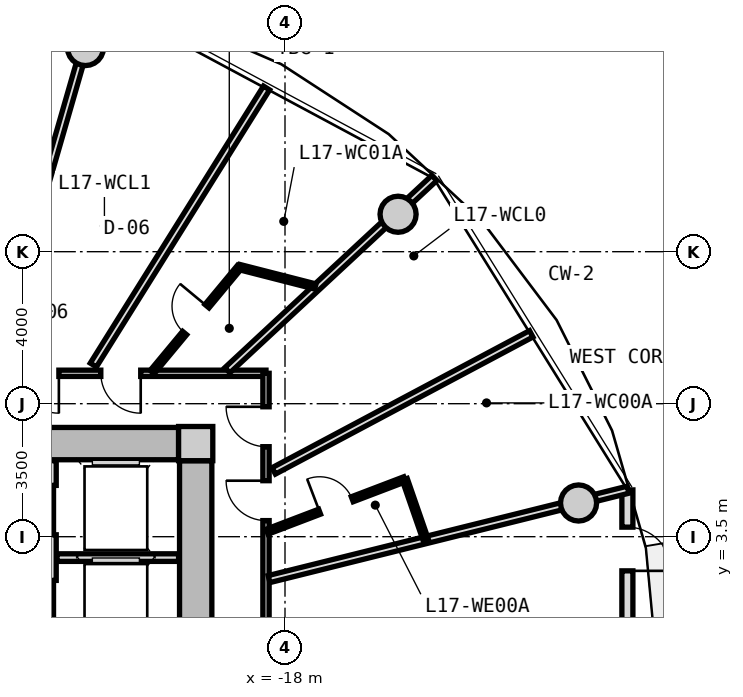
"""IFC4 building model, lengths in metres.
Left out: names, types, materials, properties, quantities, classifications, styles, units other than length and angle.
Written with IfcOpenShell. Run it as: python <this file> out.ifc"""

import sys

from ifc_helpers import new_model, si_unit, direction, frame, frame_2d, origin, origin_2d, place, context, subcontext, project, spatial, rectangle, circle, extrude, source, transform, mapped, element, fill, save


model = new_model("IFC4")
c1 = context("Model", 3, precision=1e-05, world=origin(), true_north=direction((0.0, 1.0)))
c2 = subcontext(c1, "Body", "Model", "MODEL_VIEW")
j1 = project(units=[si_unit("LENGTHUNIT", "METRE"), si_unit("PLANEANGLEUNIT", "RADIAN")], contexts=[c1])
p1 = place(None, origin())
s1 = spatial("IfcSite", under=j1, at=p1, CompositionType="ELEMENT")
p2 = place(p1, origin())
s2 = spatial("IfcBuilding", under=s1, at=p2, CompositionType="ELEMENT")
p3 = place(p2, frame((0.0, 0.0, 58.2)))
s3 = spatial("IfcBuildingStorey", under=s2, at=p3, CompositionType="ELEMENT", Elevation=58.2)
m1 = source(origin(), c2, "Body", "SweptSolid", [
    extrude(rectangle(XDim=0.9, YDim=0.9, at=origin_2d()), origin(), (0.0, 0.0, 1.0), 3.05),
])
p4 = place(p3, frame((-20.35, 5.95, 0.0), z_axis=(0.0, 0.0, 1.0), x_axis=(1.0, 0.0, 0.0)))
e1 = element("IfcColumn", 1, at=p4, inside=s3, PredefinedType="COLUMN", context=c2, shape_type="MappedRepresentation", body=[
    mapped(m1, transform((0.0, 0.0, 0.0), x_axis=(1.0, 0.0, 0.0), y_axis=(0.0, 1.0, 0.0), z_axis=(0.0, 0.0, 1.0), scale=1.0)),
])
m2 = source(origin(), c2, "Body", "SweptSolid", [
    extrude(rectangle(XDim=14.4, YDim=0.85, at=frame_2d((7.2, 0.0))), origin(), (0.0, 0.0, 1.0), 2.79),
])
p5 = place(p3, frame((-35.2, 5.95, 0.0), z_axis=(0.0, 0.0, 1.0), x_axis=(1.0, 0.0, 0.0)))
e2 = element("IfcWall", 2, at=p5, inside=s3, PredefinedType="SHEAR", context=c2, shape_type="MappedRepresentation", body=[
    mapped(m2, transform((0.0, 0.0, 0.0), x_axis=(1.0, 0.0, 0.0), y_axis=(0.0, 1.0, 0.0), z_axis=(0.0, 0.0, 1.0), scale=1.0)),
])
m3 = source(origin(), c2, "Body", "SweptSolid", [
    extrude(rectangle(XDim=11.0, YDim=0.85, at=frame_2d((5.5, 0.0))), origin(), (0.0, 0.0, 1.0), 2.79),
])
p6 = place(p3, frame((-20.35, 5.5, 0.0), z_axis=(0.0, 0.0, 1.0), x_axis=(0.0, -1.0, 0.0)))
e3 = element("IfcWall", 3, at=p6, inside=s3, PredefinedType="SHEAR", context=c2, shape_type="MappedRepresentation", body=[
    mapped(m3, transform((0.0, 0.0, 0.0), x_axis=(1.0, 0.0, 0.0), y_axis=(0.0, 1.0, 0.0), z_axis=(0.0, 0.0, 1.0), scale=1.0)),
])
p7 = place(p6, frame((5.65, 0.0, 0.0)))
e4 = element("IfcOpeningElement", 4, at=p7, cuts=e3, PredefinedType="OPENING", context=c2, shape_type="SweptSolid", body=[
    extrude(rectangle(XDim=1.2, YDim=2.15, at=frame_2d((0.6, 1.075))), frame((0.0, 0.435, 0.0), z_axis=(0.0, -1.0, 0.0), x_axis=(1.0, 0.0, 0.0)), (0.0, 0.0, 1.0), 0.87),
])
p8 = place(p6, frame((9.3, 0.0, 0.0)))
e5 = element("IfcOpeningElement", 5, at=p8, cuts=e3, PredefinedType="OPENING", context=c2, shape_type="SweptSolid", body=[
    extrude(rectangle(XDim=1.0, YDim=2.1, at=frame_2d((0.5, 1.05))), frame((0.0, 0.435, 0.0), z_axis=(0.0, -1.0, 0.0), x_axis=(1.0, 0.0, 0.0)), (0.0, 0.0, 1.0), 0.87),
])
m4 = source(origin(), c2, "Body", "SweptSolid", [
    extrude(circle(Radius=0.475, at=origin_2d()), origin(), (0.0, 0.0, 1.0), 3.05),
])
for number, where, z_axis, x_axis in (
    (6, (-10.275, 4.387, 0.0), (0.0, 0.0, 1.0), (1.0, 0.0, 0.0)),
    (7, (-15.025, 11.985, 0.0), (0.0, 0.0, 1.0), (1.0, 0.0, 0.0)),
    (8, (-23.251, 16.373, 0.0), (0.0, 0.0, 1.0), (1.0, 0.0, 0.0)),
):
    element("IfcColumn", number, at=place(p3, frame(where, z_axis=z_axis, x_axis=x_axis)), inside=s3, PredefinedType="COLUMN", context=c2, shape_type="MappedRepresentation", body=[
        mapped(m4, transform((0.0, 0.0, 0.0), x_axis=(1.0, 0.0, 0.0), y_axis=(0.0, 1.0, 0.0), z_axis=(0.0, 0.0, 1.0), scale=1.0)),
    ])
m5 = source(origin(), c2, "Body", "SweptSolid", [
    extrude(rectangle(XDim=9.462, YDim=0.29, at=frame_2d((4.731, 0.0))), origin(), (0.0, 0.0, 1.0), 2.79),
])
p9 = place(p3, frame((-8.99, 4.731, 0.0), z_axis=(0.0, 0.0, 1.0), x_axis=(0.0, -1.0, 0.0)))
e9 = element("IfcWall", 9, at=p9, inside=s3, PredefinedType="SOLIDWALL", context=c2, shape_type="MappedRepresentation", body=[
    mapped(m5, transform((0.0, 0.0, 0.0), x_axis=(1.0, 0.0, 0.0), y_axis=(0.0, 1.0, 0.0), z_axis=(0.0, 0.0, 1.0), scale=1.0)),
])
p10 = place(p9, frame((0.98, 0.0, 0.0)))
e10 = element("IfcOpeningElement", 10, at=p10, cuts=e9, PredefinedType="OPENING", context=c2, shape_type="SweptSolid", body=[
    extrude(rectangle(XDim=1.15, YDim=2.25, at=frame_2d((0.575, 1.125))), frame((0.0, 0.155, 0.0), z_axis=(0.0, -1.0, 0.0), x_axis=(1.0, 0.0, 0.0)), (0.0, 0.0, 1.0), 0.31),
])
p11 = place(p9, frame((5.081, 0.0, 0.85)))
e11 = element("IfcOpeningElement", 11, at=p11, cuts=e9, PredefinedType="OPENING", context=c2, shape_type="SweptSolid", body=[
    extrude(rectangle(XDim=1.2, YDim=1.5, at=frame_2d((0.6, 0.75))), frame((0.0, 0.155, 0.0), z_axis=(0.0, -1.0, 0.0), x_axis=(1.0, 0.0, 0.0)), (0.0, 0.0, 1.0), 0.31),
])
m6 = source(origin(), c2, "Body", "SweptSolid", [
    extrude(rectangle(XDim=5.0, YDim=0.24, at=frame_2d((2.5, 0.0))), origin(), (0.0, 0.0, 1.0), 2.775),
])
p12 = place(p3, frame((-24.14, 0.5, 0.0), z_axis=(0.0, 0.0, 1.0), x_axis=(0.0, 1.0, 0.0)))
e12 = element("IfcWall", 12, at=p12, inside=s3, PredefinedType="PARTITIONING", context=c2, shape_type="MappedRepresentation", body=[
    mapped(m6, transform((0.0, 0.0, 0.0), x_axis=(1.0, 0.0, 0.0), y_axis=(0.0, 1.0, 0.0), z_axis=(0.0, 0.0, 1.0), scale=1.0)),
])
p13 = place(p12, frame((3.05, 0.0, 0.0)))
e13 = element("IfcOpeningElement", 13, at=p13, cuts=e12, PredefinedType="OPENING", context=c2, shape_type="SweptSolid", body=[
    extrude(rectangle(XDim=1.3, YDim=2.2, at=frame_2d((0.65, 1.1))), frame((0.0, 0.13, 0.0), z_axis=(0.0, -1.0, 0.0), x_axis=(1.0, 0.0, 0.0)), (0.0, 0.0, 1.0), 0.26),
])
p14 = place(p12, frame((0.55, 0.0, 0.0)))
e14 = element("IfcOpeningElement", 14, at=p14, cuts=e12, PredefinedType="OPENING", context=c2, shape_type="SweptSolid", body=[
    extrude(rectangle(XDim=1.3, YDim=2.2, at=frame_2d((0.65, 1.1))), frame((0.0, 0.13, 0.0), z_axis=(0.0, -1.0, 0.0), x_axis=(1.0, 0.0, 0.0)), (0.0, 0.0, 1.0), 0.26),
])
m7 = source(origin(), c2, "Body", "SweptSolid", [
    extrude(rectangle(XDim=3.2, YDim=0.2, at=frame_2d((1.6, 0.0))), origin(), (0.0, 0.0, 1.0), 2.775),
])
p15 = place(p3, frame((-24.0, 2.95, 0.0), z_axis=(0.0, 0.0, 1.0), x_axis=(1.0, 0.0, 0.0)))
e15 = element("IfcWall", 15, at=p15, inside=s3, PredefinedType="PARTITIONING", context=c2, shape_type="MappedRepresentation", body=[
    mapped(m7, transform((0.0, 0.0, 0.0), x_axis=(1.0, 0.0, 0.0), y_axis=(0.0, 1.0, 0.0), z_axis=(0.0, 0.0, 1.0), scale=1.0)),
])
m8 = source(origin(), c2, "Body", "SweptSolid", [
    extrude(rectangle(XDim=19.0, YDim=0.165, at=frame_2d((9.5, 0.0))), origin(), (0.0, 0.0, 1.0), 2.775),
])
p16 = place(p3, frame((-37.5, 7.8, 0.0), z_axis=(0.0, 0.0, 1.0), x_axis=(1.0, 0.0, 0.0)))
e16 = element("IfcWall", 16, at=p16, inside=s3, PredefinedType="PARTITIONING", context=c2, shape_type="MappedRepresentation", body=[
    mapped(m8, transform((0.0, 0.0, 0.0), x_axis=(1.0, 0.0, 0.0), y_axis=(0.0, 1.0, 0.0), z_axis=(0.0, 0.0, 1.0), scale=1.0)),
])
p17 = place(p16, frame((14.653, 0.0, 0.0)))
e17 = element("IfcOpeningElement", 17, at=p17, cuts=e16, PredefinedType="OPENING", context=c2, shape_type="SweptSolid", body=[
    extrude(rectangle(XDim=1.05, YDim=2.15, at=frame_2d((0.525, 1.075))), frame((0.0, 0.093, 0.0), z_axis=(0.0, -1.0, 0.0), x_axis=(1.0, 0.0, 0.0)), (0.0, 0.0, 1.0), 0.185),
])
p18 = place(p16, frame((12.5, 0.0, 0.0)))
e18 = element("IfcOpeningElement", 18, at=p18, cuts=e16, PredefinedType="OPENING", context=c2, shape_type="SweptSolid", body=[
    extrude(rectangle(XDim=1.05, YDim=2.15, at=frame_2d((0.525, 1.075))), frame((0.0, 0.093, 0.0), z_axis=(0.0, -1.0, 0.0), x_axis=(1.0, 0.0, 0.0)), (0.0, 0.0, 1.0), 0.185),
])
p19 = place(p16, frame((9.352, 0.0, 0.0)))
e19 = element("IfcOpeningElement", 19, at=p19, cuts=e16, PredefinedType="OPENING", context=c2, shape_type="SweptSolid", body=[
    extrude(rectangle(XDim=1.05, YDim=2.15, at=frame_2d((0.525, 1.075))), frame((0.0, 0.093, 0.0), z_axis=(0.0, -1.0, 0.0), x_axis=(1.0, 0.0, 0.0)), (0.0, 0.0, 1.0), 0.185),
])
p20 = place(p16, frame((7.806, 0.0, 0.0)))
e20 = element("IfcOpeningElement", 20, at=p20, cuts=e16, PredefinedType="OPENING", context=c2, shape_type="SweptSolid", body=[
    extrude(rectangle(XDim=1.05, YDim=2.15, at=frame_2d((0.525, 1.075))), frame((0.0, 0.093, 0.0), z_axis=(0.0, -1.0, 0.0), x_axis=(1.0, 0.0, 0.0)), (0.0, 0.0, 1.0), 0.185),
])
p21 = place(p16, frame((4.773, 0.0, 0.0)))
e21 = element("IfcOpeningElement", 21, at=p21, cuts=e16, PredefinedType="OPENING", context=c2, shape_type="SweptSolid", body=[
    extrude(rectangle(XDim=1.05, YDim=2.15, at=frame_2d((0.525, 1.075))), frame((0.0, 0.093, 0.0), z_axis=(0.0, -1.0, 0.0), x_axis=(1.0, 0.0, 0.0)), (0.0, 0.0, 1.0), 0.185),
])
p22 = place(p16, frame((2.251, 0.0, 0.0)))
e22 = element("IfcOpeningElement", 22, at=p22, cuts=e16, PredefinedType="OPENING", context=c2, shape_type="SweptSolid", body=[
    extrude(rectangle(XDim=1.05, YDim=2.15, at=frame_2d((0.525, 1.075))), frame((0.0, 0.093, 0.0), z_axis=(0.0, -1.0, 0.0), x_axis=(1.0, 0.0, 0.0)), (0.0, 0.0, 1.0), 0.185),
])
m9 = source(origin(), c2, "Body", "SweptSolid", [
    extrude(rectangle(XDim=15.6, YDim=0.165, at=frame_2d((7.8, 0.0))), origin(), (0.0, 0.0, 1.0), 2.775),
])
p23 = place(p3, frame((-18.5, 7.8, 0.0), z_axis=(0.0, 0.0, 1.0), x_axis=(0.0, -1.0, 0.0)))
e23 = element("IfcWall", 23, at=p23, inside=s3, PredefinedType="PARTITIONING", context=c2, shape_type="MappedRepresentation", body=[
    mapped(m9, transform((0.0, 0.0, 0.0), x_axis=(1.0, 0.0, 0.0), y_axis=(0.0, 1.0, 0.0), z_axis=(0.0, 0.0, 1.0), scale=1.0)),
])
p24 = place(p23, frame((12.141, 0.0, 0.0)))
e24 = element("IfcOpeningElement", 24, at=p24, cuts=e23, PredefinedType="OPENING", context=c2, shape_type="SweptSolid", body=[
    extrude(rectangle(XDim=1.25, YDim=2.2, at=frame_2d((0.625, 1.1))), frame((0.0, 0.093, 0.0), z_axis=(0.0, -1.0, 0.0), x_axis=(1.0, 0.0, 0.0)), (0.0, 0.0, 1.0), 0.185),
])
p25 = place(p23, frame((7.175, 0.0, 0.0)))
e25 = element("IfcOpeningElement", 25, at=p25, cuts=e23, PredefinedType="OPENING", context=c2, shape_type="SweptSolid", body=[
    extrude(rectangle(XDim=1.25, YDim=2.2, at=frame_2d((0.625, 1.1))), frame((0.0, 0.093, 0.0), z_axis=(0.0, -1.0, 0.0), x_axis=(1.0, 0.0, 0.0)), (0.0, 0.0, 1.0), 0.185),
])
p26 = place(p23, frame((2.826, 0.0, 0.0)))
e26 = element("IfcOpeningElement", 26, at=p26, cuts=e23, PredefinedType="OPENING", context=c2, shape_type="SweptSolid", body=[
    extrude(rectangle(XDim=1.05, YDim=2.15, at=frame_2d((0.525, 1.075))), frame((0.0, 0.093, 0.0), z_axis=(0.0, -1.0, 0.0), x_axis=(1.0, 0.0, 0.0)), (0.0, 0.0, 1.0), 0.185),
])
p27 = place(p23, frame((0.881, 0.0, 0.0)))
e27 = element("IfcOpeningElement", 27, at=p27, cuts=e23, PredefinedType="OPENING", context=c2, shape_type="SweptSolid", body=[
    extrude(rectangle(XDim=1.05, YDim=2.15, at=frame_2d((0.525, 1.075))), frame((0.0, 0.093, 0.0), z_axis=(0.0, -1.0, 0.0), x_axis=(1.0, 0.0, 0.0)), (0.0, 0.0, 1.0), 0.185),
])
m10 = source(origin(), c2, "Body", "SweptSolid", [
    extrude(rectangle(XDim=9.737, YDim=0.19, at=frame_2d((4.869, 0.0))), origin(), (0.0, 0.0, 1.0), 2.225),
])
p28 = place(p3, frame((-18.42, 2.385, 0.0), z_axis=(0.0, 0.0, 1.0), x_axis=(0.970392716238, 0.241532557375, 0.0)))
e28 = element("IfcWall", 28, at=p28, inside=s3, PredefinedType="PARTITIONING", context=c2, shape_type="MappedRepresentation", body=[
    mapped(m10, transform((0.0, 0.0, 0.0), x_axis=(1.0, 0.0, 0.0), y_axis=(0.0, 1.0, 0.0), z_axis=(0.0, 0.0, 1.0), scale=1.0)),
])
m11 = source(origin(), c2, "Body", "SweptSolid", [
    extrude(rectangle(XDim=7.435, YDim=0.19, at=frame_2d((3.717, 0.0))), origin(), (0.0, 0.0, 1.0), 2.225),
])
p29 = place(p3, frame((-19.517, 7.88, 0.0), z_axis=(0.0, 0.0, 1.0), x_axis=(0.732651956848, 0.680603489652, 0.0)))
e29 = element("IfcWall", 29, at=p29, inside=s3, PredefinedType="PARTITIONING", context=c2, shape_type="MappedRepresentation", body=[
    mapped(m11, transform((0.0, 0.0, 0.0), x_axis=(1.0, 0.0, 0.0), y_axis=(0.0, 1.0, 0.0), z_axis=(0.0, 0.0, 1.0), scale=1.0)),
])
m12 = source(origin(), c2, "Body", "SweptSolid", [
    extrude(rectangle(XDim=7.677, YDim=0.19, at=frame_2d((3.838, 0.0))), origin(), (0.0, 0.0, 1.0), 2.775),
])
p30 = place(p3, frame((-18.297, 5.231, 0.0), z_axis=(0.0, 0.0, 1.0), x_axis=(0.882725057546, 0.469889851753, 0.0)))
e30 = element("IfcWall", 30, at=p30, inside=s3, PredefinedType="PARTITIONING", context=c2, shape_type="MappedRepresentation", body=[
    mapped(m12, transform((0.0, 0.0, 0.0), x_axis=(1.0, 0.0, 0.0), y_axis=(0.0, 1.0, 0.0), z_axis=(0.0, 0.0, 1.0), scale=1.0)),
])
m13 = source(origin(), c2, "Body", "SweptSolid", [
    extrude(rectangle(XDim=3.874, YDim=0.14, at=frame_2d((1.937, 0.0))), origin(), (0.0, 0.0, 1.0), 2.775),
])
p31 = place(p3, frame((-18.47, 3.632, 0.0), z_axis=(0.0, 0.0, 1.0), x_axis=(0.934461775659, 0.35606346321, 0.0)))
e31 = element("IfcWall", 31, at=p31, inside=s3, PredefinedType="PARTITIONING", context=c2, shape_type="MappedRepresentation", body=[
    mapped(m13, transform((0.0, 0.0, 0.0), x_axis=(1.0, 0.0, 0.0), y_axis=(0.0, 1.0, 0.0), z_axis=(0.0, 0.0, 1.0), scale=1.0)),
])
p32 = place(p31, frame((1.477, 0.0, 0.0)))
e32 = element("IfcOpeningElement", 32, at=p32, cuts=e31, PredefinedType="OPENING", context=c2, shape_type="SweptSolid", body=[
    extrude(rectangle(XDim=0.92, YDim=2.1, at=frame_2d((0.46, 1.05))), frame((0.0, 0.08, 0.0), z_axis=(0.0, -1.0, 0.0), x_axis=(1.0, 0.0, 0.0)), (0.0, 0.0, 1.0), 0.16),
])
m14 = source(origin(), c2, "Body", "SweptSolid", [
    extrude(rectangle(XDim=1.676, YDim=0.14, at=frame_2d((0.838, 0.0))), origin(), (0.0, 0.0, 1.0), 2.775),
])
p33 = place(p3, frame((-14.85, 5.011, 0.0), z_axis=(0.0, 0.0, 1.0), x_axis=(0.327785970556, -0.944752008469, 0.0)))
e33 = element("IfcWall", 33, at=p33, inside=s3, PredefinedType="PARTITIONING", context=c2, shape_type="MappedRepresentation", body=[
    mapped(m14, transform((0.0, 0.0, 0.0), x_axis=(1.0, 0.0, 0.0), y_axis=(0.0, 1.0, 0.0), z_axis=(0.0, 0.0, 1.0), scale=1.0)),
])
m15 = source(origin(), c2, "Body", "SweptSolid", [
    extrude(rectangle(XDim=10.196, YDim=0.19, at=frame_2d((5.098, 0.0))), origin(), (0.0, 0.0, 1.0), 2.225),
])
p34 = place(p3, frame((-25.727, 7.88, 0.0), z_axis=(0.0, 0.0, 1.0), x_axis=(0.277136420347, 0.960830580549, 0.0)))
e34 = element("IfcWall", 34, at=p34, inside=s3, PredefinedType="PARTITIONING", context=c2, shape_type="MappedRepresentation", body=[
    mapped(m15, transform((0.0, 0.0, 0.0), x_axis=(1.0, 0.0, 0.0), y_axis=(0.0, 1.0, 0.0), z_axis=(0.0, 0.0, 1.0), scale=1.0)),
])
m16 = source(origin(), c2, "Body", "SweptSolid", [
    extrude(rectangle(XDim=8.598, YDim=0.19, at=frame_2d((4.299, 0.0))), origin(), (0.0, 0.0, 1.0), 2.775),
])
p35 = place(p3, frame((-23.043, 8.017, 0.0), z_axis=(0.0, 0.0, 1.0), x_axis=(0.530039776395, 0.847972779893, 0.0)))
e35 = element("IfcWall", 35, at=p35, inside=s3, PredefinedType="PARTITIONING", context=c2, shape_type="MappedRepresentation", body=[
    mapped(m16, transform((0.0, 0.0, 0.0), x_axis=(1.0, 0.0, 0.0), y_axis=(0.0, 1.0, 0.0), z_axis=(0.0, 0.0, 1.0), scale=1.0)),
])
m17 = source(origin(), c2, "Body", "SweptSolid", [
    extrude(rectangle(XDim=3.594, YDim=0.14, at=frame_2d((1.797, 0.0))), origin(), (0.0, 0.0, 1.0), 2.775),
])
p36 = place(p3, frame((-21.496, 7.83, 0.0), z_axis=(0.0, 0.0, 1.0), x_axis=(0.639001147083, 0.769205781326, 0.0)))
e36 = element("IfcWall", 36, at=p36, inside=s3, PredefinedType="PARTITIONING", context=c2, shape_type="MappedRepresentation", body=[
    mapped(m17, transform((0.0, 0.0, 0.0), x_axis=(1.0, 0.0, 0.0), y_axis=(0.0, 1.0, 0.0), z_axis=(0.0, 0.0, 1.0), scale=1.0)),
])
p37 = place(p36, frame((1.337, 0.0, 0.0)))
e37 = element("IfcOpeningElement", 37, at=p37, cuts=e36, PredefinedType="OPENING", context=c2, shape_type="SweptSolid", body=[
    extrude(rectangle(XDim=0.92, YDim=2.1, at=frame_2d((0.46, 1.05))), frame((0.0, 0.08, 0.0), z_axis=(0.0, -1.0, 0.0), x_axis=(1.0, 0.0, 0.0)), (0.0, 0.0, 1.0), 0.16),
])
m18 = source(origin(), c2, "Body", "SweptSolid", [
    extrude(rectangle(XDim=2.062, YDim=0.14, at=frame_2d((1.031, 0.0))), origin(), (0.0, 0.0, 1.0), 2.415),
])
p38 = place(p3, frame((-19.199, 10.595, 0.0), z_axis=(0.0, 0.0, 1.0), x_axis=(0.968776253543, -0.247936626121, 0.0)))
e38 = element("IfcWall", 38, at=p38, inside=s3, PredefinedType="PARTITIONING", context=c2, shape_type="MappedRepresentation", body=[
    mapped(m18, transform((0.0, 0.0, 0.0), x_axis=(1.0, 0.0, 0.0), y_axis=(0.0, 1.0, 0.0), z_axis=(0.0, 0.0, 1.0), scale=1.0)),
])
m19 = source(origin(), c2, "Body", "SweptSolid", [
    extrude(rectangle(XDim=1.15, YDim=2.25, at=frame_2d((0.575, 1.125))), frame((0.0, 0.025, 0.0), z_axis=(0.0, -1.0, 0.0), x_axis=(1.0, 0.0, 0.0)), (0.0, 0.0, 1.0), 0.05),
])
p39 = place(p10, origin())
e39 = element("IfcDoor", 39, at=p39, inside=s3, OperationType="SINGLE_SWING_RIGHT", PredefinedType="DOOR", context=c2, shape_type="MappedRepresentation", body=[
    mapped(m19, transform((0.0, 0.0, 0.0), x_axis=(1.0, 0.0, 0.0), y_axis=(0.0, 1.0, 0.0), z_axis=(0.0, 0.0, 1.0), scale=1.0)),
])
fill(e10, e39)
m20 = source(origin(), c2, "Body", "SweptSolid", [
    extrude(rectangle(XDim=1.3, YDim=2.2, at=frame_2d((0.65, 1.1))), frame((0.0, 0.025, 0.0), z_axis=(0.0, -1.0, 0.0), x_axis=(1.0, 0.0, 0.0)), (0.0, 0.0, 1.0), 0.05),
])
p40 = place(p13, origin())
e40 = element("IfcDoor", 40, at=p40, inside=s3, OperationType="SLIDING_TO_LEFT", PredefinedType="DOOR", context=c2, shape_type="MappedRepresentation", body=[
    mapped(m20, transform((0.0, 0.0, 0.0), x_axis=(1.0, 0.0, 0.0), y_axis=(0.0, 1.0, 0.0), z_axis=(0.0, 0.0, 1.0), scale=1.0)),
])
fill(e13, e40)
p41 = place(p14, origin())
e41 = element("IfcDoor", 41, at=p41, inside=s3, OperationType="SLIDING_TO_RIGHT", PredefinedType="DOOR", context=c2, shape_type="MappedRepresentation", body=[
    mapped(m20, transform((0.0, 0.0, 0.0), x_axis=(1.0, 0.0, 0.0), y_axis=(0.0, 1.0, 0.0), z_axis=(0.0, 0.0, 1.0), scale=1.0)),
])
fill(e14, e41)
m21 = source(origin(), c2, "Body", "SweptSolid", [
    extrude(rectangle(XDim=1.05, YDim=2.15, at=frame_2d((0.525, 1.075))), frame((0.0, 0.025, 0.0), z_axis=(0.0, -1.0, 0.0), x_axis=(1.0, 0.0, 0.0)), (0.0, 0.0, 1.0), 0.05),
])
p42 = place(p26, frame((1.05, 0.0, 0.0), z_axis=(0.0, 0.0, 1.0), x_axis=(-1.0, 0.0, 0.0)))
e42 = element("IfcDoor", 42, at=p42, inside=s3, OperationType="SINGLE_SWING_RIGHT", PredefinedType="DOOR", context=c2, shape_type="MappedRepresentation", body=[
    mapped(m21, transform((0.0, 0.0, 0.0), x_axis=(1.0, 0.0, 0.0), y_axis=(0.0, 1.0, 0.0), z_axis=(0.0, 0.0, 1.0), scale=1.0)),
])
fill(e26, e42)
m22 = source(origin(), c2, "Body", "SweptSolid", [
    extrude(rectangle(XDim=0.92, YDim=2.1, at=frame_2d((0.46, 1.05))), frame((0.0, 0.025, 0.0), z_axis=(0.0, -1.0, 0.0), x_axis=(1.0, 0.0, 0.0)), (0.0, 0.0, 1.0), 0.05),
])
p43 = place(p32, origin())
e43 = element("IfcDoor", 43, at=p43, inside=s3, OperationType="SINGLE_SWING_LEFT", PredefinedType="DOOR", context=c2, shape_type="MappedRepresentation", body=[
    mapped(m22, transform((0.0, 0.0, 0.0), x_axis=(1.0, 0.0, 0.0), y_axis=(0.0, 1.0, 0.0), z_axis=(0.0, 0.0, 1.0), scale=1.0)),
])
fill(e32, e43)
p44 = place(p27, frame((1.05, 0.0, 0.0), z_axis=(0.0, 0.0, 1.0), x_axis=(-1.0, 0.0, 0.0)))
e44 = element("IfcDoor", 44, at=p44, inside=s3, OperationType="SINGLE_SWING_RIGHT", PredefinedType="DOOR", context=c2, shape_type="MappedRepresentation", body=[
    mapped(m21, transform((0.0, 0.0, 0.0), x_axis=(1.0, 0.0, 0.0), y_axis=(0.0, 1.0, 0.0), z_axis=(0.0, 0.0, 1.0), scale=1.0)),
])
fill(e27, e44)
p45 = place(p17, frame((1.05, 0.0, 0.0), z_axis=(0.0, 0.0, 1.0), x_axis=(-1.0, 0.0, 0.0)))
e45 = element("IfcDoor", 45, at=p45, inside=s3, OperationType="SINGLE_SWING_LEFT", PredefinedType="DOOR", context=c2, shape_type="MappedRepresentation", body=[
    mapped(m21, transform((0.0, 0.0, 0.0), x_axis=(1.0, 0.0, 0.0), y_axis=(0.0, 1.0, 0.0), z_axis=(0.0, 0.0, 1.0), scale=1.0)),
])
fill(e17, e45)
p46 = place(p37, origin())
e46 = element("IfcDoor", 46, at=p46, inside=s3, OperationType="SINGLE_SWING_RIGHT", PredefinedType="DOOR", context=c2, shape_type="MappedRepresentation", body=[
    mapped(m22, transform((0.0, 0.0, 0.0), x_axis=(1.0, 0.0, 0.0), y_axis=(0.0, 1.0, 0.0), z_axis=(0.0, 0.0, 1.0), scale=1.0)),
])
fill(e37, e46)
p47 = place(p18, frame((1.05, 0.0, 0.0), z_axis=(0.0, 0.0, 1.0), x_axis=(-1.0, 0.0, 0.0)))
e47 = element("IfcDoor", 47, at=p47, inside=s3, OperationType="SINGLE_SWING_LEFT", PredefinedType="DOOR", context=c2, shape_type="MappedRepresentation", body=[
    mapped(m21, transform((0.0, 0.0, 0.0), x_axis=(1.0, 0.0, 0.0), y_axis=(0.0, 1.0, 0.0), z_axis=(0.0, 0.0, 1.0), scale=1.0)),
])
fill(e18, e47)
save(model, sys.argv[1])
